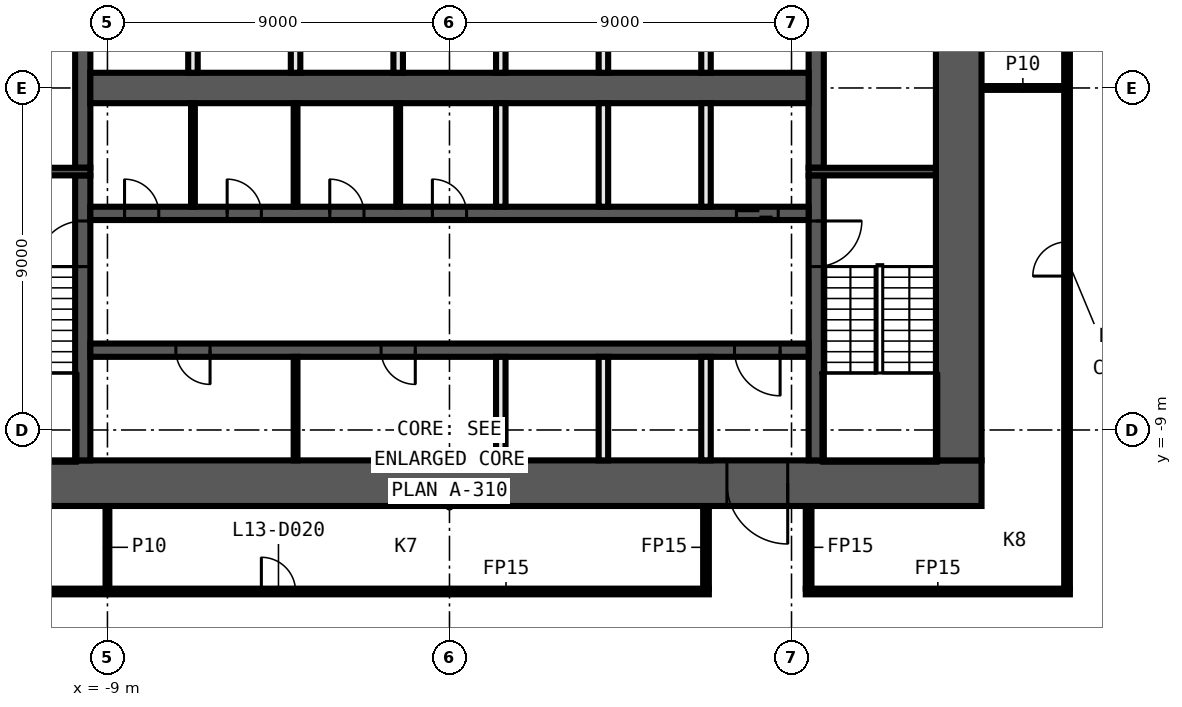
"""IFC4 building model, lengths in metres.
Left out: names, types, materials, properties, quantities, classifications, styles, units other than length and angle.
Written with IfcOpenShell. Run it as: python <this file> out.ifc"""

import sys

from ifc_helpers import new_model, si_unit, direction, frame, frame_2d, origin, place, context, subcontext, project, spatial, rectangle, extrude, element, fill, save


model = new_model("IFC4")
c1 = context("Model", 3, precision=1e-05, world=origin(), true_north=direction((0.0, 1.0)))
c2 = subcontext(c1, "Body", "Model", "MODEL_VIEW")
j1 = project(units=[si_unit("LENGTHUNIT", "METRE"), si_unit("PLANEANGLEUNIT", "RADIAN")], contexts=[c1])
p1 = place(None, origin())
s1 = spatial("IfcSite", under=j1, at=p1, CompositionType="ELEMENT")
p2 = place(p1, origin())
s2 = spatial("IfcBuilding", under=s1, at=p2, CompositionType="ELEMENT")
p3 = place(p2, frame((0.0, 0.0, 69.9)))
s3 = spatial("IfcBuildingStorey", under=s2, at=p3, CompositionType="ELEMENT", Elevation=69.9)
p4 = place(p3, frame((-16.325, -13.25, 0.0), z_axis=(0.0, 0.0, 1.0), x_axis=(1.0, 0.0, 0.0)))
e1 = element("IfcWall", 1, at=p4, inside=s3, PredefinedType="PARTITIONING", context=c2, shape_type="SweptSolid", body=[
    extrude(rectangle(XDim=23.15, YDim=0.15, at=frame_2d((11.575, 0.0))), origin(), (0.0, 0.0, 1.0), 3.3),
])
p5 = place(p4, frame((3.25, 0.0, 0.0)))
e2 = element("IfcOpeningElement", 2, at=p5, cuts=e1, PredefinedType="OPENING", context=c2, shape_type="SweptSolid", body=[
    extrude(rectangle(XDim=0.9, YDim=2.1, at=frame_2d((0.45, 1.05))), frame((0.0, 0.085, 0.0), z_axis=(0.0, -1.0, 0.0), x_axis=(1.0, 0.0, 0.0)), (0.0, 0.0, 1.0), 0.17),
])
p6 = place(p4, frame((11.375, 0.0, 0.0)))
e3 = element("IfcOpeningElement", 3, at=p6, cuts=e1, PredefinedType="OPENING", context=c2, shape_type="SweptSolid", body=[
    extrude(rectangle(XDim=0.9, YDim=2.1, at=frame_2d((0.45, 1.05))), frame((0.0, 0.085, 0.0), z_axis=(0.0, -1.0, 0.0), x_axis=(1.0, 0.0, 0.0)), (0.0, 0.0, 1.0), 0.17),
])
p7 = place(p3, frame((9.375, -13.25, 0.0), z_axis=(0.0, 0.0, 1.0), x_axis=(1.0, 0.0, 0.0)))
e4 = element("IfcWall", 4, at=p7, inside=s3, PredefinedType="PARTITIONING", context=c2, shape_type="SweptSolid", body=[
    extrude(rectangle(XDim=6.95, YDim=0.15, at=frame_2d((3.475, 0.0))), origin(), (0.0, 0.0, 1.0), 3.3),
])
p8 = place(p3, frame((14.0, 0.0, 0.0), z_axis=(0.0, 0.0, 1.0), x_axis=(1.0, 0.0, 0.0)))
e5 = element("IfcWall", 5, at=p8, inside=s3, PredefinedType="PARTITIONING", context=c2, shape_type="SweptSolid", body=[
    extrude(rectangle(XDim=2.175, YDim=0.1, at=frame_2d((1.087, 0.0))), origin(), (0.0, 0.0, 1.0), 3.3),
])
p9 = place(p3, frame((16.25, -13.175, 0.0), z_axis=(0.0, 0.0, 1.0), x_axis=(0.0, 1.0, 0.0)))
e6 = element("IfcWall", 6, at=p9, inside=s3, PredefinedType="PARTITIONING", context=c2, shape_type="SweptSolid", body=[
    extrude(rectangle(XDim=26.35, YDim=0.15, at=frame_2d((13.175, 0.0))), origin(), (0.0, 0.0, 1.0), 3.3),
])
p10 = place(p9, frame((8.225, 0.0, 0.0)))
e7 = element("IfcOpeningElement", 7, at=p10, cuts=e6, PredefinedType="OPENING", context=c2, shape_type="SweptSolid", body=[
    extrude(rectangle(XDim=0.9, YDim=2.1, at=frame_2d((0.45, 1.05))), frame((0.0, 0.085, 0.0), z_axis=(0.0, -1.0, 0.0), x_axis=(1.0, 0.0, 0.0)), (0.0, 0.0, 1.0), 0.17),
])
p11 = place(p9, frame((17.225, 0.0, 0.0)))
e8 = element("IfcOpeningElement", 8, at=p11, cuts=e6, PredefinedType="OPENING", context=c2, shape_type="SweptSolid", body=[
    extrude(rectangle(XDim=0.9, YDim=2.1, at=frame_2d((0.45, 1.05))), frame((0.0, 0.085, 0.0), z_axis=(0.0, -1.0, 0.0), x_axis=(1.0, 0.0, 0.0)), (0.0, 0.0, 1.0), 0.17),
])
for number, where, z_axis, x_axis in (
    (9, (9.45, -13.175, 0.0), (0.0, 0.0, 1.0), (0.0, 1.0, 0.0)),
    (10, (6.75, -13.175, 0.0), (0.0, 0.0, 1.0), (0.0, 1.0, 0.0)),
):
    element("IfcWall", number, at=place(p3, frame(where, z_axis=z_axis, x_axis=x_axis)), inside=s3, PredefinedType="PARTITIONING", context=c2, shape_type="SweptSolid", body=[
        extrude(rectangle(XDim=2.175, YDim=0.15, at=frame_2d((1.087, 0.0))), origin(), (0.0, 0.0, 1.0), 3.3),
    ])
p12 = place(p3, frame((-9.0, -13.175, 0.0), z_axis=(0.0, 0.0, 1.0), x_axis=(0.0, 1.0, 0.0)))
e11 = element("IfcWall", 11, at=p12, inside=s3, PredefinedType="PARTITIONING", context=c2, shape_type="SweptSolid", body=[
    extrude(rectangle(XDim=2.175, YDim=0.1, at=frame_2d((1.087, 0.0))), origin(), (0.0, 0.0, 1.0), 3.3),
])
p13 = place(p3, frame((14.0, -10.4, 0.0), z_axis=(0.0, 0.0, 1.0), x_axis=(-1.0, 0.0, 0.0)))
e12 = element("IfcWall", 12, at=p13, inside=s3, PredefinedType="SHEAR", context=c2, shape_type="SweptSolid", body=[
    extrude(rectangle(XDim=28.0, YDim=1.2, at=frame_2d((14.0, 0.0))), origin(), (0.0, 0.0, 1.0), 3.3),
])
p14 = place(p13, frame((5.1, 0.0, 0.0)))
e13 = element("IfcOpeningElement", 13, at=p14, cuts=e12, PredefinedType="OPENING", context=c2, shape_type="SweptSolid", body=[
    extrude(rectangle(XDim=1.6, YDim=2.1, at=frame_2d((0.8, 1.05))), frame((0.0, 0.61, 0.0), z_axis=(0.0, -1.0, 0.0), x_axis=(1.0, 0.0, 0.0)), (0.0, 0.0, 1.0), 1.22),
])
p15 = place(p3, frame((13.4, 9.8, 0.0), z_axis=(0.0, 0.0, 1.0), x_axis=(0.0, -1.0, 0.0)))
e14 = element("IfcWall", 14, at=p15, inside=s3, PredefinedType="SHEAR", context=c2, shape_type="SweptSolid", body=[
    extrude(rectangle(XDim=19.6, YDim=1.2, at=frame_2d((9.8, 0.0))), origin(), (0.0, 0.0, 1.0), 3.3),
])
p16 = place(p3, frame((9.65, -2.3, 0.0), z_axis=(0.0, 0.0, 1.0), x_axis=(0.0, -1.0, 0.0)))
e15 = element("IfcWall", 15, at=p16, inside=s3, PredefinedType="SHEAR", context=c2, shape_type="SweptSolid", body=[
    extrude(rectangle(XDim=7.5, YDim=0.4, at=frame_2d((3.75, 0.0))), origin(), (0.0, 0.0, 1.0), 3.3),
])
p17 = place(p16, frame((1.2, 0.0, 0.0)))
e16 = element("IfcOpeningElement", 16, at=p17, cuts=e15, PredefinedType="OPENING", context=c2, shape_type="SweptSolid", body=[
    extrude(rectangle(XDim=1.2, YDim=2.1, at=frame_2d((0.6, 1.05))), frame((0.0, 0.21, 0.0), z_axis=(0.0, -1.0, 0.0), x_axis=(1.0, 0.0, 0.0)), (0.0, 0.0, 1.0), 0.42),
])
p18 = place(p3, frame((9.65, 2.1, 0.0), z_axis=(0.0, 0.0, 1.0), x_axis=(0.0, -1.0, 0.0)))
e17 = element("IfcWall", 17, at=p18, inside=s3, PredefinedType="SHEAR", context=c2, shape_type="SweptSolid", body=[
    extrude(rectangle(XDim=4.2, YDim=0.4, at=frame_2d((2.1, 0.0))), origin(), (0.0, 0.0, 1.0), 3.3),
])
p19 = place(p18, frame((0.15, 0.0, 0.0)))
e18 = element("IfcOpeningElement", 18, at=p19, cuts=e17, PredefinedType="OPENING", context=c2, shape_type="SweptSolid", body=[
    extrude(rectangle(XDim=0.9, YDim=2.1, at=frame_2d((0.45, 1.05))), frame((0.0, 0.21, 0.0), z_axis=(0.0, -1.0, 0.0), x_axis=(1.0, 0.0, 0.0)), (0.0, 0.0, 1.0), 0.42),
])
p20 = place(p3, frame((-9.65, -9.8, 0.0), z_axis=(0.0, 0.0, 1.0), x_axis=(0.0, 1.0, 0.0)))
e19 = element("IfcWall", 19, at=p20, inside=s3, PredefinedType="SHEAR", context=c2, shape_type="SweptSolid", body=[
    extrude(rectangle(XDim=7.5, YDim=0.4, at=frame_2d((3.75, 0.0))), origin(), (0.0, 0.0, 1.0), 3.3),
])
p21 = place(p20, frame((5.1, 0.0, 0.0)))
e20 = element("IfcOpeningElement", 20, at=p21, cuts=e19, PredefinedType="OPENING", context=c2, shape_type="SweptSolid", body=[
    extrude(rectangle(XDim=1.2, YDim=2.1, at=frame_2d((0.6, 1.05))), frame((0.0, 0.21, 0.0), z_axis=(0.0, -1.0, 0.0), x_axis=(1.0, 0.0, 0.0)), (0.0, 0.0, 1.0), 0.42),
])
p22 = place(p3, frame((-9.65, -2.1, 0.0), z_axis=(0.0, 0.0, 1.0), x_axis=(0.0, 1.0, 0.0)))
e21 = element("IfcWall", 21, at=p22, inside=s3, PredefinedType="SHEAR", context=c2, shape_type="SweptSolid", body=[
    extrude(rectangle(XDim=4.2, YDim=0.4, at=frame_2d((2.1, 0.0))), origin(), (0.0, 0.0, 1.0), 3.3),
])
for number, where, z_axis, x_axis in (
    (22, (9.45, -2.2, 0.0), (0.0, 0.0, 1.0), (1.0, 0.0, 0.0)),
    (23, (-9.45, -2.2, 0.0), (0.0, 0.0, 1.0), (-1.0, 0.0, 0.0)),
):
    element("IfcWall", number, at=place(p3, frame(where, z_axis=z_axis, x_axis=x_axis)), inside=s3, PredefinedType="SHEAR", context=c2, shape_type="SweptSolid", body=[
        extrude(rectangle(XDim=3.35, YDim=0.2, at=frame_2d((1.675, 0.0))), origin(), (0.0, 0.0, 1.0), 3.3),
    ])
p23 = place(p3, frame((-9.45, -3.3, 0.0), z_axis=(0.0, 0.0, 1.0), x_axis=(1.0, 0.0, 0.0)))
e24 = element("IfcWall", 24, at=p23, inside=s3, PredefinedType="SHEAR", context=c2, shape_type="SweptSolid", body=[
    extrude(rectangle(XDim=18.9, YDim=0.35, at=frame_2d((9.45, 0.0))), origin(), (0.0, 0.0, 1.0), 3.3),
])
p24 = place(p23, frame((17.0, 0.0, 0.0)))
e25 = element("IfcOpeningElement", 25, at=p24, cuts=e24, PredefinedType="OPENING", context=c2, shape_type="SweptSolid", body=[
    extrude(rectangle(XDim=1.1, YDim=2.1, at=frame_2d((0.55, 1.05))), frame((0.0, 0.185, 0.0), z_axis=(0.0, -1.0, 0.0), x_axis=(1.0, 0.0, 0.0)), (0.0, 0.0, 1.0), 0.37),
])
p25 = place(p23, frame((0.9, 0.0, 0.0)))
e26 = element("IfcOpeningElement", 26, at=p25, cuts=e24, PredefinedType="OPENING", context=c2, shape_type="SweptSolid", body=[
    extrude(rectangle(XDim=0.9, YDim=2.1, at=frame_2d((0.45, 1.05))), frame((0.0, 0.185, 0.0), z_axis=(0.0, -1.0, 0.0), x_axis=(1.0, 0.0, 0.0)), (0.0, 0.0, 1.0), 0.37),
])
p26 = place(p23, frame((3.6, 0.0, 0.0)))
e27 = element("IfcOpeningElement", 27, at=p26, cuts=e24, PredefinedType="OPENING", context=c2, shape_type="SweptSolid", body=[
    extrude(rectangle(XDim=0.9, YDim=2.1, at=frame_2d((0.45, 1.05))), frame((0.0, 0.185, 0.0), z_axis=(0.0, -1.0, 0.0), x_axis=(1.0, 0.0, 0.0)), (0.0, 0.0, 1.0), 0.37),
])
p27 = place(p23, frame((6.3, 0.0, 0.0)))
e28 = element("IfcOpeningElement", 28, at=p27, cuts=e24, PredefinedType="OPENING", context=c2, shape_type="SweptSolid", body=[
    extrude(rectangle(XDim=0.9, YDim=2.1, at=frame_2d((0.45, 1.05))), frame((0.0, 0.185, 0.0), z_axis=(0.0, -1.0, 0.0), x_axis=(1.0, 0.0, 0.0)), (0.0, 0.0, 1.0), 0.37),
])
p28 = place(p23, frame((9.0, 0.0, 0.0)))
e29 = element("IfcOpeningElement", 29, at=p28, cuts=e24, PredefinedType="OPENING", context=c2, shape_type="SweptSolid", body=[
    extrude(rectangle(XDim=0.9, YDim=2.1, at=frame_2d((0.45, 1.05))), frame((0.0, 0.185, 0.0), z_axis=(0.0, -1.0, 0.0), x_axis=(1.0, 0.0, 0.0)), (0.0, 0.0, 1.0), 0.37),
])
p29 = place(p3, frame((9.45, -6.9, 0.0), z_axis=(0.0, 0.0, 1.0), x_axis=(-1.0, 0.0, 0.0)))
e30 = element("IfcWall", 30, at=p29, inside=s3, PredefinedType="SHEAR", context=c2, shape_type="SweptSolid", body=[
    extrude(rectangle(XDim=18.9, YDim=0.35, at=frame_2d((9.45, 0.0))), origin(), (0.0, 0.0, 1.0), 3.3),
])
p30 = place(p29, frame((0.75, 0.0, 0.0)))
e31 = element("IfcOpeningElement", 31, at=p30, cuts=e30, PredefinedType="OPENING", context=c2, shape_type="SweptSolid", body=[
    extrude(rectangle(XDim=1.2, YDim=2.1, at=frame_2d((0.6, 1.05))), frame((0.0, 0.185, 0.0), z_axis=(0.0, -1.0, 0.0), x_axis=(1.0, 0.0, 0.0)), (0.0, 0.0, 1.0), 0.37),
])
p31 = place(p29, frame((15.75, 0.0, 0.0)))
e32 = element("IfcOpeningElement", 32, at=p31, cuts=e30, PredefinedType="OPENING", context=c2, shape_type="SweptSolid", body=[
    extrude(rectangle(XDim=0.9, YDim=2.1, at=frame_2d((0.45, 1.05))), frame((0.0, 0.185, 0.0), z_axis=(0.0, -1.0, 0.0), x_axis=(1.0, 0.0, 0.0)), (0.0, 0.0, 1.0), 0.37),
])
p32 = place(p29, frame((10.35, 0.0, 0.0)))
e33 = element("IfcOpeningElement", 33, at=p32, cuts=e30, PredefinedType="OPENING", context=c2, shape_type="SweptSolid", body=[
    extrude(rectangle(XDim=0.9, YDim=2.1, at=frame_2d((0.45, 1.05))), frame((0.0, 0.185, 0.0), z_axis=(0.0, -1.0, 0.0), x_axis=(1.0, 0.0, 0.0)), (0.0, 0.0, 1.0), 0.37),
])
p33 = place(p3, frame((-9.45, 0.0, 0.0), z_axis=(0.0, 0.0, 1.0), x_axis=(1.0, 0.0, 0.0)))
e34 = element("IfcWall", 34, at=p33, inside=s3, PredefinedType="SHEAR", context=c2, shape_type="SweptSolid", body=[
    extrude(rectangle(XDim=18.9, YDim=0.8, at=frame_2d((9.45, 0.0))), origin(), (0.0, 0.0, 1.0), 3.3),
])
for number, where, z_axis, x_axis in (
    (35, (6.75, -9.8, 0.0), (0.0, 0.0, 1.0), (0.0, 1.0, 0.0)),
    (36, (6.75, -3.125, 0.0), (0.0, 0.0, 1.0), (0.0, 1.0, 0.0)),
    (37, (6.75, 0.4, 0.0), (0.0, 0.0, 1.0), (0.0, 1.0, 0.0)),
    (38, (4.05, -9.8, 0.0), (0.0, 0.0, 1.0), (0.0, 1.0, 0.0)),
    (39, (4.05, -3.125, 0.0), (0.0, 0.0, 1.0), (0.0, 1.0, 0.0)),
    (40, (4.05, 0.4, 0.0), (0.0, 0.0, 1.0), (0.0, 1.0, 0.0)),
    (41, (1.35, -9.8, 0.0), (0.0, 0.0, 1.0), (0.0, 1.0, 0.0)),
    (42, (1.35, -3.125, 0.0), (0.0, 0.0, 1.0), (0.0, 1.0, 0.0)),
    (43, (1.35, 0.4, 0.0), (0.0, 0.0, 1.0), (0.0, 1.0, 0.0)),
):
    element("IfcWall", number, at=place(p3, frame(where, z_axis=z_axis, x_axis=x_axis)), inside=s3, PredefinedType="SOLIDWALL", context=c2, shape_type="SweptSolid", body=[
        extrude(rectangle(XDim=2.725, YDim=0.25, at=frame_2d((1.363, 0.0))), origin(), (0.0, 0.0, 1.0), 3.3),
    ])
p34 = place(p3, frame((-1.35, -3.125, 0.0), z_axis=(0.0, 0.0, 1.0), x_axis=(0.0, 1.0, 0.0)))
e44 = element("IfcWall", 44, at=p34, inside=s3, PredefinedType="PARTITIONING", context=c2, shape_type="SweptSolid", body=[
    extrude(rectangle(XDim=2.725, YDim=0.1, at=frame_2d((1.363, 0.0))), origin(), (0.0, 0.0, 1.0), 3.3),
])
p35 = place(p3, frame((-1.35, 0.4, 0.0), z_axis=(0.0, 0.0, 1.0), x_axis=(0.0, 1.0, 0.0)))
e45 = element("IfcWall", 45, at=p35, inside=s3, PredefinedType="SOLIDWALL", context=c2, shape_type="SweptSolid", body=[
    extrude(rectangle(XDim=2.725, YDim=0.25, at=frame_2d((1.363, 0.0))), origin(), (0.0, 0.0, 1.0), 3.3),
])
for number, where, z_axis, x_axis in (
    (46, (-4.05, -9.8, 0.0), (0.0, 0.0, 1.0), (0.0, 1.0, 0.0)),
    (47, (-4.05, -3.125, 0.0), (0.0, 0.0, 1.0), (0.0, 1.0, 0.0)),
):
    element("IfcWall", number, at=place(p3, frame(where, z_axis=z_axis, x_axis=x_axis)), inside=s3, PredefinedType="PARTITIONING", context=c2, shape_type="SweptSolid", body=[
        extrude(rectangle(XDim=2.725, YDim=0.1, at=frame_2d((1.363, 0.0))), origin(), (0.0, 0.0, 1.0), 3.3),
    ])
p36 = place(p3, frame((-4.05, 0.4, 0.0), z_axis=(0.0, 0.0, 1.0), x_axis=(0.0, 1.0, 0.0)))
e48 = element("IfcWall", 48, at=p36, inside=s3, PredefinedType="SOLIDWALL", context=c2, shape_type="SweptSolid", body=[
    extrude(rectangle(XDim=2.725, YDim=0.25, at=frame_2d((1.363, 0.0))), origin(), (0.0, 0.0, 1.0), 3.3),
])
p37 = place(p3, frame((-6.75, -3.125, 0.0), z_axis=(0.0, 0.0, 1.0), x_axis=(0.0, 1.0, 0.0)))
e49 = element("IfcWall", 49, at=p37, inside=s3, PredefinedType="PARTITIONING", context=c2, shape_type="SweptSolid", body=[
    extrude(rectangle(XDim=2.725, YDim=0.1, at=frame_2d((1.363, 0.0))), origin(), (0.0, 0.0, 1.0), 3.3),
])
p38 = place(p3, frame((-6.75, 0.4, 0.0), z_axis=(0.0, 0.0, 1.0), x_axis=(0.0, 1.0, 0.0)))
e50 = element("IfcWall", 50, at=p38, inside=s3, PredefinedType="SOLIDWALL", context=c2, shape_type="SweptSolid", body=[
    extrude(rectangle(XDim=2.725, YDim=0.25, at=frame_2d((1.363, 0.0))), origin(), (0.0, 0.0, 1.0), 3.3),
])
p39 = place(p6, origin())
e51 = element("IfcDoor", 51, at=p39, inside=s3, OperationType="SINGLE_SWING_RIGHT", PredefinedType="DOOR", context=c2, shape_type="SweptSolid", body=[
    extrude(rectangle(XDim=0.9, YDim=2.1, at=frame_2d((0.45, 1.05))), frame((0.0, 0.025, 0.0), z_axis=(0.0, -1.0, 0.0), x_axis=(1.0, 0.0, 0.0)), (0.0, 0.0, 1.0), 0.05),
])
fill(e3, e51)
p40 = place(p10, origin())
e52 = element("IfcDoor", 52, at=p40, inside=s3, OperationType="SINGLE_SWING_LEFT", PredefinedType="DOOR", context=c2, shape_type="SweptSolid", body=[
    extrude(rectangle(XDim=0.9, YDim=2.1, at=frame_2d((0.45, 1.05))), frame((0.0, 0.025, 0.0), z_axis=(0.0, -1.0, 0.0), x_axis=(1.0, 0.0, 0.0)), (0.0, 0.0, 1.0), 0.05),
])
fill(e7, e52)
p41 = place(p24, origin())
e53 = element("IfcDoor", 53, at=p41, inside=s3, OperationType="DOUBLE_DOOR_SLIDING", PredefinedType="DOOR", context=c2, shape_type="SweptSolid", body=[
    extrude(rectangle(XDim=1.1, YDim=2.1, at=frame_2d((0.55, 1.05))), frame((0.0, 0.025, 0.0), z_axis=(0.0, -1.0, 0.0), x_axis=(1.0, 0.0, 0.0)), (0.0, 0.0, 1.0), 0.05),
])
fill(e25, e53)
p42 = place(p14, origin())
e54 = element("IfcDoor", 54, at=p42, inside=s3, OperationType="DOUBLE_DOOR_SINGLE_SWING", PredefinedType="DOOR", context=c2, shape_type="SweptSolid", body=[
    extrude(rectangle(XDim=1.6, YDim=2.1, at=frame_2d((0.8, 1.05))), frame((0.0, 0.025, 0.0), z_axis=(0.0, -1.0, 0.0), x_axis=(1.0, 0.0, 0.0)), (0.0, 0.0, 1.0), 0.05),
])
fill(e13, e54)
p43 = place(p30, origin())
e55 = element("IfcDoor", 55, at=p43, inside=s3, OperationType="SINGLE_SWING_LEFT", PredefinedType="DOOR", context=c2, shape_type="SweptSolid", body=[
    extrude(rectangle(XDim=1.2, YDim=2.1, at=frame_2d((0.6, 1.05))), frame((0.0, 0.025, 0.0), z_axis=(0.0, -1.0, 0.0), x_axis=(1.0, 0.0, 0.0)), (0.0, 0.0, 1.0), 0.05),
])
fill(e31, e55)
p44 = place(p25, origin())
e56 = element("IfcDoor", 56, at=p44, inside=s3, OperationType="SINGLE_SWING_RIGHT", PredefinedType="DOOR", context=c2, shape_type="SweptSolid", body=[
    extrude(rectangle(XDim=0.9, YDim=2.1, at=frame_2d((0.45, 1.05))), frame((0.0, 0.025, 0.0), z_axis=(0.0, -1.0, 0.0), x_axis=(1.0, 0.0, 0.0)), (0.0, 0.0, 1.0), 0.05),
])
fill(e26, e56)
p45 = place(p26, origin())
e57 = element("IfcDoor", 57, at=p45, inside=s3, OperationType="SINGLE_SWING_LEFT", PredefinedType="DOOR", context=c2, shape_type="SweptSolid", body=[
    extrude(rectangle(XDim=0.9, YDim=2.1, at=frame_2d((0.45, 1.05))), frame((0.0, 0.025, 0.0), z_axis=(0.0, -1.0, 0.0), x_axis=(1.0, 0.0, 0.0)), (0.0, 0.0, 1.0), 0.05),
])
fill(e27, e57)
p46 = place(p27, origin())
e58 = element("IfcDoor", 58, at=p46, inside=s3, OperationType="SINGLE_SWING_RIGHT", PredefinedType="DOOR", context=c2, shape_type="SweptSolid", body=[
    extrude(rectangle(XDim=0.9, YDim=2.1, at=frame_2d((0.45, 1.05))), frame((0.0, 0.025, 0.0), z_axis=(0.0, -1.0, 0.0), x_axis=(1.0, 0.0, 0.0)), (0.0, 0.0, 1.0), 0.05),
])
fill(e28, e58)
p47 = place(p28, origin())
e59 = element("IfcDoor", 59, at=p47, inside=s3, OperationType="SINGLE_SWING_LEFT", PredefinedType="DOOR", context=c2, shape_type="SweptSolid", body=[
    extrude(rectangle(XDim=0.9, YDim=2.1, at=frame_2d((0.45, 1.05))), frame((0.0, 0.025, 0.0), z_axis=(0.0, -1.0, 0.0), x_axis=(1.0, 0.0, 0.0)), (0.0, 0.0, 1.0), 0.05),
])
fill(e29, e59)
p48 = place(p31, origin())
e60 = element("IfcDoor", 60, at=p48, inside=s3, OperationType="SINGLE_SWING_RIGHT", PredefinedType="DOOR", context=c2, shape_type="SweptSolid", body=[
    extrude(rectangle(XDim=0.9, YDim=2.1, at=frame_2d((0.45, 1.05))), frame((0.0, 0.025, 0.0), z_axis=(0.0, -1.0, 0.0), x_axis=(1.0, 0.0, 0.0)), (0.0, 0.0, 1.0), 0.05),
])
fill(e32, e60)
p49 = place(p32, origin())
e61 = element("IfcDoor", 61, at=p49, inside=s3, OperationType="SINGLE_SWING_LEFT", PredefinedType="DOOR", context=c2, shape_type="SweptSolid", body=[
    extrude(rectangle(XDim=0.9, YDim=2.1, at=frame_2d((0.45, 1.05))), frame((0.0, 0.025, 0.0), z_axis=(0.0, -1.0, 0.0), x_axis=(1.0, 0.0, 0.0)), (0.0, 0.0, 1.0), 0.05),
])
fill(e33, e61)
p50 = place(p17, origin())
e62 = element("IfcDoor", 62, at=p50, inside=s3, OperationType="SINGLE_SWING_RIGHT", PredefinedType="DOOR", context=c2, shape_type="SweptSolid", body=[
    extrude(rectangle(XDim=1.2, YDim=2.1, at=frame_2d((0.6, 1.05))), frame((0.0, 0.025, 0.0), z_axis=(0.0, -1.0, 0.0), x_axis=(1.0, 0.0, 0.0)), (0.0, 0.0, 1.0), 0.05),
])
fill(e16, e62)
p51 = place(p21, origin())
e63 = element("IfcDoor", 63, at=p51, inside=s3, OperationType="SINGLE_SWING_LEFT", PredefinedType="DOOR", context=c2, shape_type="SweptSolid", body=[
    extrude(rectangle(XDim=1.2, YDim=2.1, at=frame_2d((0.6, 1.05))), frame((0.0, 0.025, 0.0), z_axis=(0.0, -1.0, 0.0), x_axis=(1.0, 0.0, 0.0)), (0.0, 0.0, 1.0), 0.05),
])
fill(e20, e63)
save(model, sys.argv[1])
